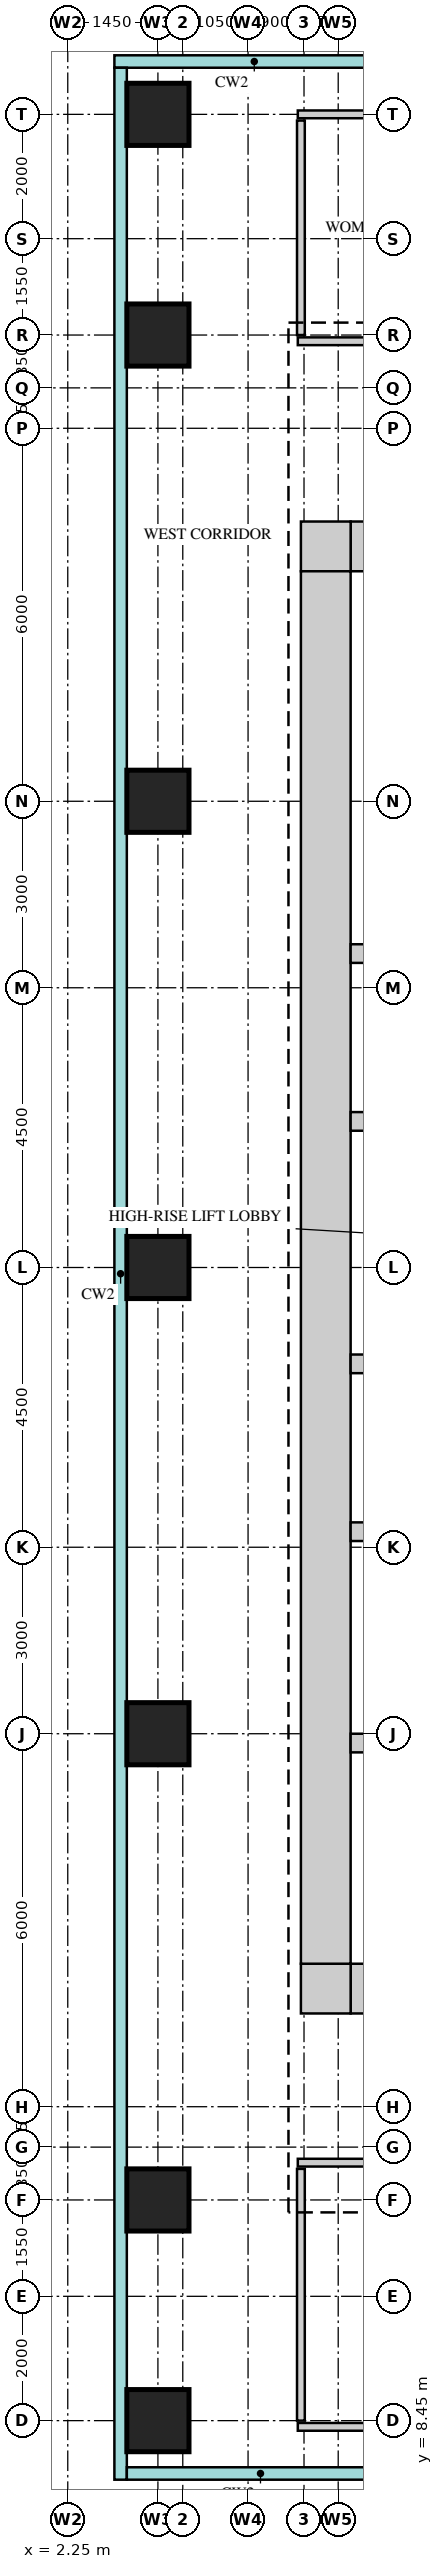
"""IFC4 building model, lengths in metres.
Left out: names, types, materials, properties, quantities, classifications, styles, units other than length and angle.
Written with IfcOpenShell. Run it as: python <this file> out.ifc"""

import sys

from ifc_helpers import new_model, si_unit, direction, frame, frame_2d, origin, origin_2d, place, context, subcontext, project, spatial, rectangle, extrude, source, transform, mapped, element, save


model = new_model("IFC4")
c1 = context("Model", 3, precision=1e-05, world=origin(), true_north=direction((0.0, 1.0)))
c2 = subcontext(c1, "Body", "Model", "MODEL_VIEW")
j1 = project(units=[si_unit("LENGTHUNIT", "METRE"), si_unit("PLANEANGLEUNIT", "RADIAN")], contexts=[c1])
p1 = place(None, origin())
s1 = spatial("IfcSite", under=j1, at=p1, CompositionType="ELEMENT")
p2 = place(p1, origin())
s2 = spatial("IfcBuilding", under=s1, at=p2, CompositionType="ELEMENT")
p3 = place(p2, frame((0.0, 0.0, 192.7)))
s3 = spatial("IfcBuildingStorey", under=s2, at=p3, CompositionType="ELEMENT", Elevation=192.7)
m1 = source(origin(), c2, "Body", "SweptSolid", [
    extrude(rectangle(XDim=13.4, YDim=0.8, at=frame_2d((6.7, 0.0))), origin(), (0.0, 0.0, 1.0), 3.75),
])
p4 = place(p3, frame((6.8, 38.6, 0.0), z_axis=(0.0, 0.0, 1.0), x_axis=(1.0, 0.0, 0.0)))
e1 = element("IfcWall", 1, at=p4, inside=s3, PredefinedType="SHEAR", context=c2, shape_type="MappedRepresentation", body=[
    mapped(m1, transform((0.0, 0.0, 0.0))),
])
m2 = source(origin(), c2, "Body", "SweptSolid", [
    extrude(rectangle(XDim=0.9, YDim=2.1, at=frame_2d((0.45, 1.05))), frame((0.0, 0.41, 0.0), z_axis=(0.0, -1.0, 0.0), x_axis=(1.0, 0.0, 0.0)), (0.0, 0.0, 1.0), 0.82),
])
p5 = place(p4, frame((1.75, 0.0, 0.0)))
e2 = element("IfcOpeningElement", 2, at=p5, cuts=e1, PredefinedType="OPENING", context=c2, shape_type="MappedRepresentation", body=[
    mapped(m2, transform((0.0, 0.0, 0.0))),
])
p6 = place(p4, frame((8.45, 0.0, 0.0)))
e3 = element("IfcOpeningElement", 3, at=p6, cuts=e1, PredefinedType="OPENING", context=c2, shape_type="MappedRepresentation", body=[
    mapped(m2, transform((0.0, 0.0, 0.0))),
])
m3 = source(origin(), c2, "Body", "SweptSolid", [
    extrude(rectangle(XDim=0.8, YDim=0.8, at=frame_2d((0.4, 0.0))), origin(), (0.0, 0.0, 1.0), 3.75),
])
p7 = place(p3, frame((6.0, 38.6, 0.0), z_axis=(0.0, 0.0, 1.0), x_axis=(1.0, 0.0, 0.0)))
e4 = element("IfcWall", 4, at=p7, inside=s3, PredefinedType="SHEAR", context=c2, shape_type="MappedRepresentation", body=[
    mapped(m3, transform((0.0, 0.0, 0.0))),
])
p8 = place(p3, frame((6.8, 15.4, 0.0), z_axis=(0.0, 0.0, 1.0), x_axis=(1.0, 0.0, 0.0)))
e5 = element("IfcWall", 5, at=p8, inside=s3, PredefinedType="SHEAR", context=c2, shape_type="MappedRepresentation", body=[
    mapped(m1, transform((0.0, 0.0, 0.0))),
])
m4 = source(origin(), c2, "Body", "SweptSolid", [
    extrude(rectangle(XDim=1.2, YDim=2.1, at=frame_2d((0.6, 1.05))), frame((0.0, 0.41, 0.0), z_axis=(0.0, -1.0, 0.0), x_axis=(1.0, 0.0, 0.0)), (0.0, 0.0, 1.0), 0.82),
])
p9 = place(p8, frame((5.4, 0.0, 0.0)))
e6 = element("IfcOpeningElement", 6, at=p9, cuts=e5, PredefinedType="OPENING", context=c2, shape_type="MappedRepresentation", body=[
    mapped(m4, transform((0.0, 0.0, 0.0))),
])
p10 = place(p8, frame((2.05, 0.0, 0.0)))
e7 = element("IfcOpeningElement", 7, at=p10, cuts=e5, PredefinedType="OPENING", context=c2, shape_type="MappedRepresentation", body=[
    mapped(m4, transform((0.0, 0.0, 0.0))),
])
m5 = source(origin(), c2, "Body", "SweptSolid", [
    extrude(rectangle(XDim=1.0, YDim=2.1, at=frame_2d((0.5, 1.05))), frame((0.0, 0.41, 0.0), z_axis=(0.0, -1.0, 0.0), x_axis=(1.0, 0.0, 0.0)), (0.0, 0.0, 1.0), 0.82),
])
p11 = place(p8, frame((7.9, 0.0, 0.0)))
e8 = element("IfcOpeningElement", 8, at=p11, cuts=e5, PredefinedType="OPENING", context=c2, shape_type="MappedRepresentation", body=[
    mapped(m5, transform((0.0, 0.0, 0.0))),
])
p12 = place(p3, frame((6.0, 15.4, 0.0), z_axis=(0.0, 0.0, 1.0), x_axis=(1.0, 0.0, 0.0)))
e9 = element("IfcWall", 9, at=p12, inside=s3, PredefinedType="SHEAR", context=c2, shape_type="MappedRepresentation", body=[
    mapped(m3, transform((0.0, 0.0, 0.0))),
])
m6 = source(origin(), c2, "Body", "SweptSolid", [
    extrude(rectangle(XDim=22.4, YDim=0.8, at=frame_2d((11.2, 0.0))), origin(), (0.0, 0.0, 1.0), 3.75),
])
p13 = place(p3, frame((6.4, 15.8, 0.0), z_axis=(0.0, 0.0, 1.0), x_axis=(0.0, 1.0, 0.0)))
e10 = element("IfcWall", 10, at=p13, inside=s3, PredefinedType="SHEAR", context=c2, shape_type="MappedRepresentation", body=[
    mapped(m6, transform((0.0, 0.0, 0.0))),
])
m7 = source(origin(), c2, "Body", "SweptSolid", [
    extrude(rectangle(XDim=13.4, YDim=0.3, at=frame_2d((6.7, 0.0))), origin(), (0.0, 0.0, 1.0), 3.75),
])
p14 = place(p3, frame((6.8, 22.75, 0.0), z_axis=(0.0, 0.0, 1.0), x_axis=(1.0, 0.0, 0.0)))
e11 = element("IfcWall", 11, at=p14, inside=s3, PredefinedType="STANDARD", context=c2, shape_type="MappedRepresentation", body=[
    mapped(m7, transform((0.0, 0.0, 0.0))),
])
m8 = source(origin(), c2, "Body", "SweptSolid", [
    extrude(rectangle(XDim=9.275, YDim=0.3, at=frame_2d((4.637, 0.0))), origin(), (0.0, 0.0, 1.0), 3.75),
])
p15 = place(p3, frame((6.8, 19.35, 0.0), z_axis=(0.0, 0.0, 1.0), x_axis=(1.0, 0.0, 0.0)))
e12 = element("IfcWall", 12, at=p15, inside=s3, PredefinedType="STANDARD", context=c2, shape_type="MappedRepresentation", body=[
    mapped(m8, transform((0.0, 0.0, 0.0))),
])
m9 = source(origin(), c2, "Body", "SweptSolid", [
    extrude(rectangle(XDim=1.2, YDim=2.1, at=frame_2d((0.6, 1.05))), frame((0.0, 0.16, 0.0), z_axis=(0.0, -1.0, 0.0), x_axis=(1.0, 0.0, 0.0)), (0.0, 0.0, 1.0), 0.32),
])
p16 = place(p15, frame((0.85, 0.0, 0.0)))
e13 = element("IfcOpeningElement", 13, at=p16, cuts=e12, PredefinedType="OPENING", context=c2, shape_type="MappedRepresentation", body=[
    mapped(m9, transform((0.0, 0.0, 0.0))),
])
p17 = place(p15, frame((3.2, 0.0, 0.0)))
e14 = element("IfcOpeningElement", 14, at=p17, cuts=e12, PredefinedType="OPENING", context=c2, shape_type="MappedRepresentation", body=[
    mapped(m9, transform((0.0, 0.0, 0.0))),
])
p18 = place(p15, frame((5.45, 0.0, 0.0)))
e15 = element("IfcOpeningElement", 15, at=p18, cuts=e12, PredefinedType="OPENING", context=c2, shape_type="MappedRepresentation", body=[
    mapped(m9, transform((0.0, 0.0, 0.0))),
])
p19 = place(p15, frame((7.6, 0.0, 0.0)))
e16 = element("IfcOpeningElement", 16, at=p19, cuts=e12, PredefinedType="OPENING", context=c2, shape_type="MappedRepresentation", body=[
    mapped(m9, transform((0.0, 0.0, 0.0))),
])
p20 = place(p3, frame((6.8, 32.05, 0.0), z_axis=(0.0, 0.0, 1.0), x_axis=(1.0, 0.0, 0.0)))
e17 = element("IfcWall", 17, at=p20, inside=s3, PredefinedType="STANDARD", context=c2, shape_type="MappedRepresentation", body=[
    mapped(m7, transform((0.0, 0.0, 0.0))),
])
p21 = place(p3, frame((6.8, 29.35, 0.0), z_axis=(0.0, 0.0, 1.0), x_axis=(1.0, 0.0, 0.0)))
e18 = element("IfcWall", 18, at=p21, inside=s3, PredefinedType="STANDARD", context=c2, shape_type="MappedRepresentation", body=[
    mapped(m7, transform((0.0, 0.0, 0.0))),
])
p22 = place(p21, frame((0.95, 0.0, 0.0)))
e19 = element("IfcOpeningElement", 19, at=p22, cuts=e18, PredefinedType="OPENING", context=c2, shape_type="MappedRepresentation", body=[
    mapped(m9, transform((0.0, 0.0, 0.0))),
])
p23 = place(p21, frame((3.5, 0.0, 0.0)))
e20 = element("IfcOpeningElement", 20, at=p23, cuts=e18, PredefinedType="OPENING", context=c2, shape_type="MappedRepresentation", body=[
    mapped(m9, transform((0.0, 0.0, 0.0))),
])
p24 = place(p21, frame((6.05, 0.0, 0.0)))
e21 = element("IfcOpeningElement", 21, at=p24, cuts=e18, PredefinedType="OPENING", context=c2, shape_type="MappedRepresentation", body=[
    mapped(m9, transform((0.0, 0.0, 0.0))),
])
p25 = place(p21, frame((8.6, 0.0, 0.0)))
e22 = element("IfcOpeningElement", 22, at=p25, cuts=e18, PredefinedType="OPENING", context=c2, shape_type="MappedRepresentation", body=[
    mapped(m9, transform((0.0, 0.0, 0.0))),
])
p26 = place(p21, frame((11.15, 0.0, 0.0)))
e23 = element("IfcOpeningElement", 23, at=p26, cuts=e18, PredefinedType="OPENING", context=c2, shape_type="MappedRepresentation", body=[
    mapped(m9, transform((0.0, 0.0, 0.0))),
])
p27 = place(p3, frame((6.8, 25.45, 0.0), z_axis=(0.0, 0.0, 1.0), x_axis=(1.0, 0.0, 0.0)))
e24 = element("IfcWall", 24, at=p27, inside=s3, PredefinedType="STANDARD", context=c2, shape_type="MappedRepresentation", body=[
    mapped(m7, transform((0.0, 0.0, 0.0))),
])
p28 = place(p27, frame((0.95, 0.0, 0.0)))
e25 = element("IfcOpeningElement", 25, at=p28, cuts=e24, PredefinedType="OPENING", context=c2, shape_type="MappedRepresentation", body=[
    mapped(m9, transform((0.0, 0.0, 0.0))),
])
p29 = place(p27, frame((3.5, 0.0, 0.0)))
e26 = element("IfcOpeningElement", 26, at=p29, cuts=e24, PredefinedType="OPENING", context=c2, shape_type="MappedRepresentation", body=[
    mapped(m9, transform((0.0, 0.0, 0.0))),
])
p30 = place(p27, frame((6.05, 0.0, 0.0)))
e27 = element("IfcOpeningElement", 27, at=p30, cuts=e24, PredefinedType="OPENING", context=c2, shape_type="MappedRepresentation", body=[
    mapped(m9, transform((0.0, 0.0, 0.0))),
])
p31 = place(p27, frame((8.6, 0.0, 0.0)))
e28 = element("IfcOpeningElement", 28, at=p31, cuts=e24, PredefinedType="OPENING", context=c2, shape_type="MappedRepresentation", body=[
    mapped(m9, transform((0.0, 0.0, 0.0))),
])
p32 = place(p27, frame((11.15, 0.0, 0.0)))
e29 = element("IfcOpeningElement", 29, at=p32, cuts=e24, PredefinedType="OPENING", context=c2, shape_type="MappedRepresentation", body=[
    mapped(m9, transform((0.0, 0.0, 0.0))),
])
m10 = source(origin(), c2, "Body", "SweptSolid", [
    extrude(rectangle(XDim=1.0, YDim=1.0, at=origin_2d()), origin(), (0.0, 0.0, 1.0), 3.75),
])
for number, where, z_axis, x_axis in (
    (30, (3.7, 8.45, 0.0), (0.0, 0.0, 1.0), (1.0, 0.0, 0.0)),
    (31, (3.7, 12.0, 0.0), (0.0, 0.0, 1.0), (1.0, 0.0, 0.0)),
    (32, (3.7, 19.5, 0.0), (0.0, 0.0, 1.0), (1.0, 0.0, 0.0)),
    (33, (3.7, 27.0, 0.0), (0.0, 0.0, 1.0), (1.0, 0.0, 0.0)),
    (34, (3.7, 34.5, 0.0), (0.0, 0.0, 1.0), (1.0, 0.0, 0.0)),
    (35, (3.7, 42.0, 0.0), (0.0, 0.0, 1.0), (1.0, 0.0, 0.0)),
    (36, (3.7, 45.55, 0.0), (0.0, 0.0, 1.0), (1.0, 0.0, 0.0)),
):
    element("IfcColumn", number, at=place(p3, frame(where, z_axis=z_axis, x_axis=x_axis)), inside=s3, PredefinedType="COLUMN", context=c2, shape_type="MappedRepresentation", body=[
        mapped(m10, transform((0.0, 0.0, 0.0))),
    ])
m11 = source(origin(), c2, "Body", "SweptSolid", [
    extrude(rectangle(XDim=7.95, YDim=0.125, at=frame_2d((3.975, 0.0))), origin(), (0.0, 0.0, 1.0), 3.25),
])
p33 = place(p3, frame((5.95, 8.35, 0.0), z_axis=(0.0, 0.0, 1.0), x_axis=(1.0, 0.0, 0.0)))
e37 = element("IfcWall", 37, at=p33, inside=s3, PredefinedType="PARTITIONING", context=c2, shape_type="MappedRepresentation", body=[
    mapped(m11, transform((0.0, 0.0, 0.0))),
])
m12 = source(origin(), c2, "Body", "SweptSolid", [
    extrude(rectangle(XDim=0.9, YDim=2.1, at=frame_2d((0.45, 1.05))), frame((0.0, 0.073, 0.0), z_axis=(0.0, -1.0, 0.0), x_axis=(1.0, 0.0, 0.0)), (0.0, 0.0, 1.0), 0.145),
])
p34 = place(p33, frame((3.8, 0.0, 0.0)))
e38 = element("IfcOpeningElement", 38, at=p34, cuts=e37, PredefinedType="OPENING", context=c2, shape_type="MappedRepresentation", body=[
    mapped(m12, transform((0.0, 0.0, 0.0))),
])
m13 = source(origin(), c2, "Body", "SweptSolid", [
    extrude(rectangle(XDim=4.05, YDim=0.125, at=frame_2d((2.025, 0.0))), origin(), (0.0, 0.0, 1.0), 3.8),
])
p35 = place(p3, frame((6.0, 8.45, 0.0), z_axis=(0.0, 0.0, 1.0), x_axis=(0.0, 1.0, 0.0)))
e39 = element("IfcWall", 39, at=p35, inside=s3, PredefinedType="PARTITIONING", context=c2, shape_type="MappedRepresentation", body=[
    mapped(m13, transform((0.0, 0.0, 0.0))),
])
m14 = source(origin(), c2, "Body", "SweptSolid", [
    extrude(rectangle(XDim=8.0, YDim=0.125, at=frame_2d((4.0, 0.0))), origin(), (0.0, 0.0, 1.0), 3.8),
])
p36 = place(p3, frame((5.95, 12.6, 0.0), z_axis=(0.0, 0.0, 1.0), x_axis=(1.0, 0.0, 0.0)))
e40 = element("IfcWall", 40, at=p36, inside=s3, PredefinedType="PARTITIONING", context=c2, shape_type="MappedRepresentation", body=[
    mapped(m14, transform((0.0, 0.0, 0.0))),
])
m15 = source(origin(), c2, "Body", "SweptSolid", [
    extrude(rectangle(XDim=7.95, YDim=0.125, at=frame_2d((3.975, 0.0))), origin(), (0.0, 0.0, 1.0), 3.8),
])
p37 = place(p3, frame((5.95, 41.9, 0.0), z_axis=(0.0, 0.0, 1.0), x_axis=(1.0, 0.0, 0.0)))
e41 = element("IfcWall", 41, at=p37, inside=s3, PredefinedType="PARTITIONING", context=c2, shape_type="MappedRepresentation", body=[
    mapped(m15, transform((0.0, 0.0, 0.0))),
])
p38 = place(p37, frame((1.55, 0.0, 0.0)))
e42 = element("IfcOpeningElement", 42, at=p38, cuts=e41, PredefinedType="OPENING", context=c2, shape_type="MappedRepresentation", body=[
    mapped(m12, transform((0.0, 0.0, 0.0))),
])
p39 = place(p37, frame((5.65, 0.0, 0.0)))
e43 = element("IfcOpeningElement", 43, at=p39, cuts=e41, PredefinedType="OPENING", context=c2, shape_type="MappedRepresentation", body=[
    mapped(m12, transform((0.0, 0.0, 0.0))),
])
m16 = source(origin(), c2, "Body", "SweptSolid", [
    extrude(rectangle(XDim=3.45, YDim=0.125, at=frame_2d((1.725, 0.0))), origin(), (0.0, 0.0, 1.0), 3.8),
])
p40 = place(p3, frame((6.0, 42.0, 0.0), z_axis=(0.0, 0.0, 1.0), x_axis=(0.0, 1.0, 0.0)))
e44 = element("IfcWall", 44, at=p40, inside=s3, PredefinedType="PARTITIONING", context=c2, shape_type="MappedRepresentation", body=[
    mapped(m16, transform((0.0, 0.0, 0.0))),
])
p41 = place(p3, frame((5.95, 45.55, 0.0), z_axis=(0.0, 0.0, 1.0), x_axis=(1.0, 0.0, 0.0)))
e45 = element("IfcWall", 45, at=p41, inside=s3, PredefinedType="PARTITIONING", context=c2, shape_type="MappedRepresentation", body=[
    mapped(m11, transform((0.0, 0.0, 0.0))),
])
save(model, sys.argv[1])
